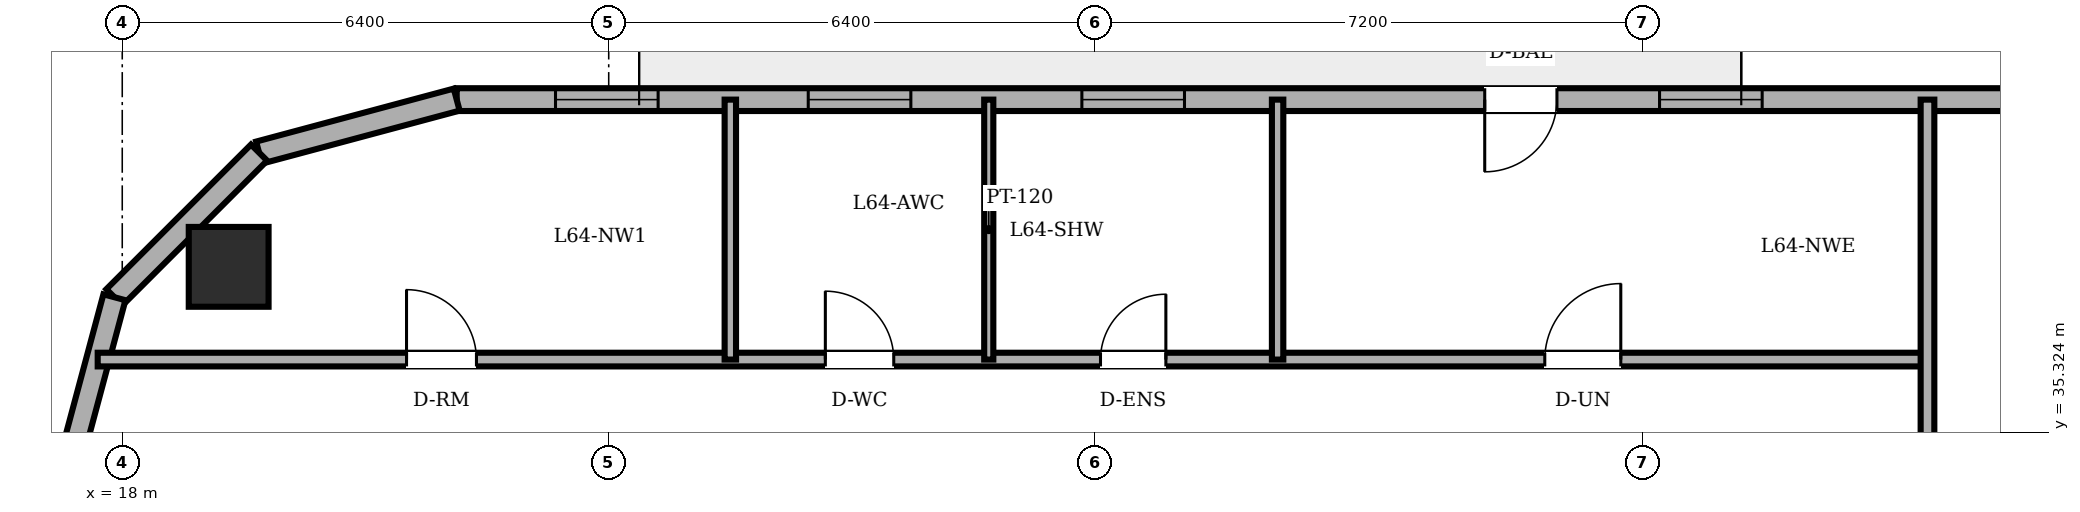
"""IFC4 building model, lengths in metres.
Left out: names, types, materials, properties, quantities, classifications, styles, units other than length and angle.
Written with IfcOpenShell. Run it as: python <this file> out.ifc"""

import sys

from ifc_helpers import new_model, si_unit, direction, frame, frame_2d, origin, origin_2d, place, context, subcontext, project, spatial, rectangle, circle, extrude, element, fill, save


model = new_model("IFC4")
c1 = context("Model", 3, precision=1e-05, world=origin(), true_north=direction((0.0, 1.0)))
c2 = subcontext(c1, "Body", "Model", "MODEL_VIEW")
j1 = project(units=[si_unit("LENGTHUNIT", "METRE"), si_unit("PLANEANGLEUNIT", "RADIAN")], contexts=[c1])
p1 = place(None, origin())
s1 = spatial("IfcSite", under=j1, at=p1, CompositionType="ELEMENT")
p2 = place(p1, origin())
s2 = spatial("IfcBuilding", under=s1, at=p2, CompositionType="ELEMENT")
p3 = place(p2, frame((0.0, 0.0, 244.5)))
s3 = spatial("IfcBuildingStorey", under=s2, at=p3, CompositionType="ELEMENT", Elevation=244.5)
p4 = place(p3, frame((19.4, 37.5, 0.0), z_axis=(0.0, 0.0, 1.0), x_axis=(1.0, 0.0, 0.0)))
e1 = element("IfcColumn", 1, at=p4, inside=s3, PredefinedType="COLUMN", context=c2, shape_type="SweptSolid", body=[
    extrude(circle(Radius=0.525, at=origin_2d()), origin(), (0.0, 0.0, 1.0), 3.6),
])
p5 = place(p3, frame((54.885, 39.7, 0.0), z_axis=(0.0, 0.0, 1.0), x_axis=(-1.0, 0.0, 0.0)))
e2 = element("IfcWall", 2, at=p5, inside=s3, PredefinedType="SOLIDWALL", context=c2, shape_type="SweptSolid", body=[
    extrude(rectangle(XDim=32.485, YDim=0.3, at=frame_2d((16.243, 0.0))), origin(), (0.0, 0.0, 1.0), 3.36),
])
p6 = place(p5, frame((18.01, 0.0, 0.0)))
e3 = element("IfcOpeningElement", 3, at=p6, cuts=e2, PredefinedType="OPENING", context=c2, shape_type="SweptSolid", body=[
    extrude(rectangle(XDim=0.95, YDim=2.2, at=frame_2d((0.475, 1.1))), frame((0.0, 0.16, 0.0), z_axis=(0.0, -1.0, 0.0), x_axis=(1.0, 0.0, 0.0)), (0.0, 0.0, 1.0), 0.32),
])
p7 = place(p5, frame((3.937, 0.0, 0.85)))
e4 = element("IfcOpeningElement", 4, at=p7, cuts=e2, PredefinedType="OPENING", context=c2, shape_type="SweptSolid", body=[
    extrude(rectangle(XDim=1.35, YDim=1.55, at=frame_2d((0.675, 0.775))), frame((0.0, 0.16, 0.0), z_axis=(0.0, -1.0, 0.0), x_axis=(1.0, 0.0, 0.0)), (0.0, 0.0, 1.0), 0.32),
])
p8 = place(p5, frame((8.198, 0.0, 0.85)))
e5 = element("IfcOpeningElement", 5, at=p8, cuts=e2, PredefinedType="OPENING", context=c2, shape_type="SweptSolid", body=[
    extrude(rectangle(XDim=1.35, YDim=1.55, at=frame_2d((0.675, 0.775))), frame((0.0, 0.16, 0.0), z_axis=(0.0, -1.0, 0.0), x_axis=(1.0, 0.0, 0.0)), (0.0, 0.0, 1.0), 0.32),
])
p9 = place(p5, frame((15.31, 0.0, 0.85)))
e6 = element("IfcOpeningElement", 6, at=p9, cuts=e2, PredefinedType="OPENING", context=c2, shape_type="SweptSolid", body=[
    extrude(rectangle(XDim=1.35, YDim=1.55, at=frame_2d((0.675, 0.775))), frame((0.0, 0.16, 0.0), z_axis=(0.0, -1.0, 0.0), x_axis=(1.0, 0.0, 0.0)), (0.0, 0.0, 1.0), 0.32),
])
p10 = place(p5, frame((22.91, 0.0, 0.85)))
e7 = element("IfcOpeningElement", 7, at=p10, cuts=e2, PredefinedType="OPENING", context=c2, shape_type="SweptSolid", body=[
    extrude(rectangle(XDim=1.35, YDim=1.55, at=frame_2d((0.675, 0.775))), frame((0.0, 0.16, 0.0), z_axis=(0.0, -1.0, 0.0), x_axis=(1.0, 0.0, 0.0)), (0.0, 0.0, 1.0), 0.32),
])
p11 = place(p5, frame((26.51, 0.0, 0.85)))
e8 = element("IfcOpeningElement", 8, at=p11, cuts=e2, PredefinedType="OPENING", context=c2, shape_type="SweptSolid", body=[
    extrude(rectangle(XDim=1.35, YDim=1.55, at=frame_2d((0.675, 0.775))), frame((0.0, 0.16, 0.0), z_axis=(0.0, -1.0, 0.0), x_axis=(1.0, 0.0, 0.0)), (0.0, 0.0, 1.0), 0.32),
])
p12 = place(p5, frame((29.835, 0.0, 0.85)))
e9 = element("IfcOpeningElement", 9, at=p12, cuts=e2, PredefinedType="OPENING", context=c2, shape_type="SweptSolid", body=[
    extrude(rectangle(XDim=1.35, YDim=1.55, at=frame_2d((0.675, 0.775))), frame((0.0, 0.16, 0.0), z_axis=(0.0, -1.0, 0.0), x_axis=(1.0, 0.0, 0.0)), (0.0, 0.0, 1.0), 0.32),
])
p13 = place(p3, frame((22.4, 39.7, 0.0), z_axis=(0.0, 0.0, 1.0), x_axis=(-0.965889330541, -0.258955210695, 0.0)))
e10 = element("IfcWall", 10, at=p13, inside=s3, PredefinedType="SOLIDWALL", context=c2, shape_type="SweptSolid", body=[
    extrude(rectangle(XDim=2.692, YDim=0.3, at=frame_2d((1.346, 0.0))), origin(), (0.0, 0.0, 1.0), 3.36),
])
p14 = place(p3, frame((19.8, 39.003, 0.0), z_axis=(0.0, 0.0, 1.0), x_axis=(-0.707152139074, -0.70706142039, 0.0)))
e11 = element("IfcWall", 11, at=p14, inside=s3, PredefinedType="SOLIDWALL", context=c2, shape_type="SweptSolid", body=[
    extrude(rectangle(XDim=2.691, YDim=0.3, at=frame_2d((1.346, 0.0))), origin(), (0.0, 0.0, 1.0), 3.36),
])
p15 = place(p3, frame((17.897, 37.1, 0.0), z_axis=(0.0, 0.0, 1.0), x_axis=(-0.258932525951, -0.965895412042, 0.0)))
e12 = element("IfcWall", 12, at=p15, inside=s3, PredefinedType="SOLIDWALL", context=c2, shape_type="SweptSolid", body=[
    extrude(rectangle(XDim=2.692, YDim=0.3, at=frame_2d((1.346, 0.0))), origin(), (0.0, 0.0, 1.0), 3.36),
])
p16 = place(p3, frame((17.677, 36.28, 0.0), z_axis=(0.0, 0.0, 1.0), x_axis=(1.0, 0.0, 0.0)))
e13 = element("IfcWall", 13, at=p16, inside=s3, PredefinedType="PARTITIONING", context=c2, shape_type="SweptSolid", body=[
    extrude(rectangle(XDim=24.073, YDim=0.18, at=frame_2d((12.037, 0.0))), origin(), (0.0, 0.0, 1.0), 3.36),
])
p17 = place(p16, frame((9.573, 0.0, 0.0)))
e14 = element("IfcOpeningElement", 14, at=p17, cuts=e13, PredefinedType="OPENING", context=c2, shape_type="SweptSolid", body=[
    extrude(rectangle(XDim=0.9, YDim=2.1, at=frame_2d((0.45, 1.05))), frame((0.0, 0.1, 0.0), z_axis=(0.0, -1.0, 0.0), x_axis=(1.0, 0.0, 0.0)), (0.0, 0.0, 1.0), 0.2),
])
p18 = place(p16, frame((13.193, 0.0, 0.0)))
e15 = element("IfcOpeningElement", 15, at=p18, cuts=e13, PredefinedType="OPENING", context=c2, shape_type="SweptSolid", body=[
    extrude(rectangle(XDim=0.86, YDim=2.1, at=frame_2d((0.43, 1.05))), frame((0.0, 0.1, 0.0), z_axis=(0.0, -1.0, 0.0), x_axis=(1.0, 0.0, 0.0)), (0.0, 0.0, 1.0), 0.2),
])
p19 = place(p16, frame((4.063, 0.0, 0.0)))
e16 = element("IfcOpeningElement", 16, at=p19, cuts=e13, PredefinedType="OPENING", context=c2, shape_type="SweptSolid", body=[
    extrude(rectangle(XDim=0.92, YDim=2.1, at=frame_2d((0.46, 1.05))), frame((0.0, 0.1, 0.0), z_axis=(0.0, -1.0, 0.0), x_axis=(1.0, 0.0, 0.0)), (0.0, 0.0, 1.0), 0.2),
])
p20 = place(p16, frame((19.038, 0.0, 0.0)))
e17 = element("IfcOpeningElement", 17, at=p20, cuts=e13, PredefinedType="OPENING", context=c2, shape_type="SweptSolid", body=[
    extrude(rectangle(XDim=1.0, YDim=2.15, at=frame_2d((0.5, 1.075))), frame((0.0, 0.1, 0.0), z_axis=(0.0, -1.0, 0.0), x_axis=(1.0, 0.0, 0.0)), (0.0, 0.0, 1.0), 0.2),
])
p21 = place(p3, frame((26.0, 36.28, 0.0), z_axis=(0.0, 0.0, 1.0), x_axis=(0.0, 1.0, 0.0)))
e18 = element("IfcWall", 18, at=p21, inside=s3, PredefinedType="PARTITIONING", context=c2, shape_type="SweptSolid", body=[
    extrude(rectangle(XDim=3.42, YDim=0.15, at=frame_2d((1.71, 0.0))), origin(), (0.0, 0.0, 1.0), 3.36),
])
p22 = place(p3, frame((29.4, 36.28, 0.0), z_axis=(0.0, 0.0, 1.0), x_axis=(0.0, 1.0, 0.0)))
e19 = element("IfcWall", 19, at=p22, inside=s3, PredefinedType="PARTITIONING", context=c2, shape_type="SweptSolid", body=[
    extrude(rectangle(XDim=3.42, YDim=0.12, at=frame_2d((1.71, 0.0))), origin(), (0.0, 0.0, 1.0), 3.36),
])
p23 = place(p3, frame((33.2, 36.28, 0.0), z_axis=(0.0, 0.0, 1.0), x_axis=(0.0, 1.0, 0.0)))
e20 = element("IfcWall", 20, at=p23, inside=s3, PredefinedType="PARTITIONING", context=c2, shape_type="SweptSolid", body=[
    extrude(rectangle(XDim=3.42, YDim=0.15, at=frame_2d((1.71, 0.0))), origin(), (0.0, 0.0, 1.0), 3.36),
])
p24 = place(p3, frame((41.75, 25.18, 0.0), z_axis=(0.0, 0.0, 1.0), x_axis=(0.0, 1.0, 0.0)))
e21 = element("IfcWall", 21, at=p24, inside=s3, PredefinedType="PARTITIONING", context=c2, shape_type="SweptSolid", body=[
    extrude(rectangle(XDim=14.52, YDim=0.18, at=frame_2d((7.26, 0.0))), origin(), (0.0, 0.0, 1.0), 3.36),
])
p25 = place(p6, origin())
e22 = element("IfcDoor", 22, at=p25, inside=s3, OperationType="SINGLE_SWING_RIGHT", PredefinedType="DOOR", context=c2, shape_type="SweptSolid", body=[
    extrude(rectangle(XDim=0.95, YDim=2.2, at=frame_2d((0.475, 1.1))), frame((0.0, 0.025, 0.0), z_axis=(0.0, -1.0, 0.0), x_axis=(1.0, 0.0, 0.0)), (0.0, 0.0, 1.0), 0.05),
])
fill(e3, e22)
p26 = place(p9, origin())
e23 = element("IfcWindow", 23, at=p26, inside=s3, PartitioningType="SINGLE_PANEL", PredefinedType="WINDOW", context=c2, shape_type="SweptSolid", body=[
    extrude(rectangle(XDim=1.35, YDim=1.55, at=frame_2d((0.675, 0.775))), frame((0.0, 0.03, 0.0), z_axis=(0.0, -1.0, 0.0), x_axis=(1.0, 0.0, 0.0)), (0.0, 0.0, 1.0), 0.06),
])
fill(e6, e23)
p27 = place(p10, origin())
e24 = element("IfcWindow", 24, at=p27, inside=s3, PartitioningType="SINGLE_PANEL", PredefinedType="WINDOW", context=c2, shape_type="SweptSolid", body=[
    extrude(rectangle(XDim=1.35, YDim=1.55, at=frame_2d((0.675, 0.775))), frame((0.0, 0.03, 0.0), z_axis=(0.0, -1.0, 0.0), x_axis=(1.0, 0.0, 0.0)), (0.0, 0.0, 1.0), 0.06),
])
fill(e7, e24)
p28 = place(p11, origin())
e25 = element("IfcWindow", 25, at=p28, inside=s3, PartitioningType="SINGLE_PANEL", PredefinedType="WINDOW", context=c2, shape_type="SweptSolid", body=[
    extrude(rectangle(XDim=1.35, YDim=1.55, at=frame_2d((0.675, 0.775))), frame((0.0, 0.03, 0.0), z_axis=(0.0, -1.0, 0.0), x_axis=(1.0, 0.0, 0.0)), (0.0, 0.0, 1.0), 0.06),
])
fill(e8, e25)
p29 = place(p12, origin())
e26 = element("IfcWindow", 26, at=p29, inside=s3, PartitioningType="SINGLE_PANEL", PredefinedType="WINDOW", context=c2, shape_type="SweptSolid", body=[
    extrude(rectangle(XDim=1.35, YDim=1.55, at=frame_2d((0.675, 0.775))), frame((0.0, 0.03, 0.0), z_axis=(0.0, -1.0, 0.0), x_axis=(1.0, 0.0, 0.0)), (0.0, 0.0, 1.0), 0.06),
])
fill(e9, e26)
p30 = place(p17, origin())
e27 = element("IfcDoor", 27, at=p30, inside=s3, OperationType="SINGLE_SWING_LEFT", PredefinedType="DOOR", context=c2, shape_type="SweptSolid", body=[
    extrude(rectangle(XDim=0.9, YDim=2.1, at=frame_2d((0.45, 1.05))), frame((0.0, 0.025, 0.0), z_axis=(0.0, -1.0, 0.0), x_axis=(1.0, 0.0, 0.0)), (0.0, 0.0, 1.0), 0.05),
])
fill(e14, e27)
p31 = place(p18, origin())
e28 = element("IfcDoor", 28, at=p31, inside=s3, OperationType="SINGLE_SWING_RIGHT", PredefinedType="DOOR", context=c2, shape_type="SweptSolid", body=[
    extrude(rectangle(XDim=0.86, YDim=2.1, at=frame_2d((0.43, 1.05))), frame((0.0, 0.025, 0.0), z_axis=(0.0, -1.0, 0.0), x_axis=(1.0, 0.0, 0.0)), (0.0, 0.0, 1.0), 0.05),
])
fill(e15, e28)
p32 = place(p19, origin())
e29 = element("IfcDoor", 29, at=p32, inside=s3, OperationType="SINGLE_SWING_LEFT", PredefinedType="DOOR", context=c2, shape_type="SweptSolid", body=[
    extrude(rectangle(XDim=0.92, YDim=2.1, at=frame_2d((0.46, 1.05))), frame((0.0, 0.025, 0.0), z_axis=(0.0, -1.0, 0.0), x_axis=(1.0, 0.0, 0.0)), (0.0, 0.0, 1.0), 0.05),
])
fill(e16, e29)
p33 = place(p20, origin())
e30 = element("IfcDoor", 30, at=p33, inside=s3, OperationType="SINGLE_SWING_RIGHT", PredefinedType="DOOR", context=c2, shape_type="SweptSolid", body=[
    extrude(rectangle(XDim=1.0, YDim=2.15, at=frame_2d((0.5, 1.075))), frame((0.0, 0.025, 0.0), z_axis=(0.0, -1.0, 0.0), x_axis=(1.0, 0.0, 0.0)), (0.0, 0.0, 1.0), 0.05),
])
fill(e17, e30)
save(model, sys.argv[1])
